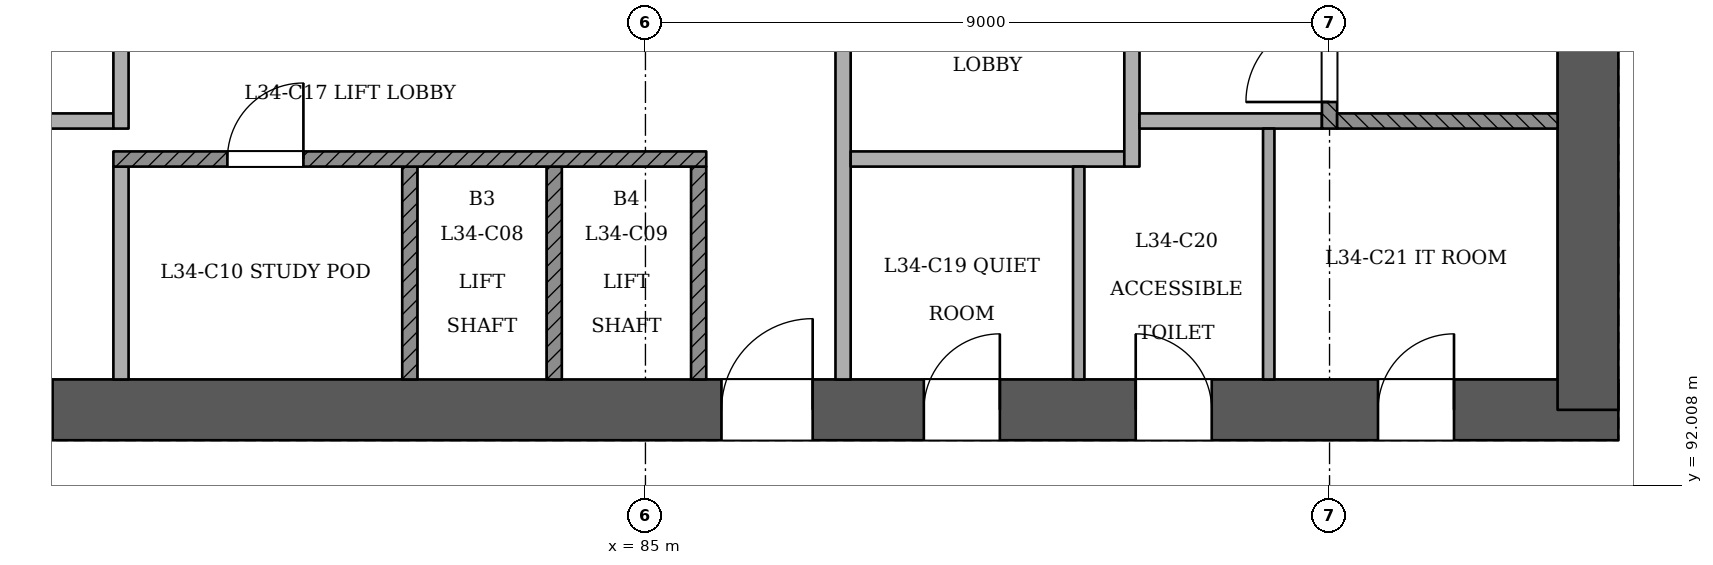
"""IFC4 building model, lengths in metres.
Left out: names, types, materials, properties, quantities, classifications, styles, units other than length and angle.
Written with IfcOpenShell. Run it as: python <this file> out.ifc"""

import sys

from ifc_helpers import new_model, si_unit, direction, frame, frame_2d, origin, place, context, subcontext, project, spatial, rectangle, extrude, element, fill, save


model = new_model("IFC4")
c1 = context("Model", 3, precision=1e-05, world=origin(), true_north=direction((0.0, 1.0)))
c2 = subcontext(c1, "Body", "Model", "MODEL_VIEW")
j1 = project(units=[si_unit("LENGTHUNIT", "METRE"), si_unit("PLANEANGLEUNIT", "RADIAN")], contexts=[c1])
p1 = place(None, origin())
s1 = spatial("IfcSite", under=j1, at=p1, CompositionType="ELEMENT")
p2 = place(p1, origin())
s2 = spatial("IfcBuilding", under=s1, at=p2, CompositionType="ELEMENT")
p3 = place(p2, frame((0.0, 0.0, 135.0)))
s3 = spatial("IfcBuildingStorey", under=s2, at=p3, CompositionType="ELEMENT", Elevation=135.0)
p4 = place(p3, frame((72.6, 93.0, 0.0), z_axis=(0.0, 0.0, 1.0), x_axis=(1.0, 0.0, 0.0)))
e1 = element("IfcWall", 1, at=p4, inside=s3, PredefinedType="SHEAR", context=c2, shape_type="SweptSolid", body=[
    extrude(rectangle(XDim=25.2, YDim=0.8, at=frame_2d((12.6, 0.0))), origin(), (0.0, 0.0, 1.0), 3.6),
])
p5 = place(p4, frame((1.2, 0.0, 0.0)))
e2 = element("IfcOpeningElement", 2, at=p5, cuts=e1, PredefinedType="OPENING", context=c2, shape_type="SweptSolid", body=[
    extrude(rectangle(XDim=1.2, YDim=2.1, at=frame_2d((0.6, 1.05))), frame((0.0, 0.411, 0.0), z_axis=(0.0, -1.0, 0.0), x_axis=(1.0, 0.0, 0.0)), (0.0, 0.0, 1.0), 0.821),
])
p6 = place(p4, frame((3.4, 0.0, 0.0)))
e3 = element("IfcOpeningElement", 3, at=p6, cuts=e1, PredefinedType="OPENING", context=c2, shape_type="SweptSolid", body=[
    extrude(rectangle(XDim=1.2, YDim=2.1, at=frame_2d((0.6, 1.05))), frame((0.0, 0.411, 0.0), z_axis=(0.0, -1.0, 0.0), x_axis=(1.0, 0.0, 0.0)), (0.0, 0.0, 1.0), 0.821),
])
p7 = place(p4, frame((13.4, 0.0, 0.0)))
e4 = element("IfcOpeningElement", 4, at=p7, cuts=e1, PredefinedType="OPENING", context=c2, shape_type="SweptSolid", body=[
    extrude(rectangle(XDim=1.2, YDim=2.1, at=frame_2d((0.6, 1.05))), frame((0.0, 0.411, 0.0), z_axis=(0.0, -1.0, 0.0), x_axis=(1.0, 0.0, 0.0)), (0.0, 0.0, 1.0), 0.821),
])
p8 = place(p4, frame((16.062, 0.0, 0.0)))
e5 = element("IfcOpeningElement", 5, at=p8, cuts=e1, PredefinedType="OPENING", context=c2, shape_type="SweptSolid", body=[
    extrude(rectangle(XDim=1.0, YDim=2.1, at=frame_2d((0.5, 1.05))), frame((0.0, 0.411, 0.0), z_axis=(0.0, -1.0, 0.0), x_axis=(1.0, 0.0, 0.0)), (0.0, 0.0, 1.0), 0.821),
])
p9 = place(p4, frame((18.85, 0.0, 0.0)))
e6 = element("IfcOpeningElement", 6, at=p9, cuts=e1, PredefinedType="OPENING", context=c2, shape_type="SweptSolid", body=[
    extrude(rectangle(XDim=1.0, YDim=2.1, at=frame_2d((0.5, 1.05))), frame((0.0, 0.411, 0.0), z_axis=(0.0, -1.0, 0.0), x_axis=(1.0, 0.0, 0.0)), (0.0, 0.0, 1.0), 0.821),
])
p10 = place(p4, frame((22.038, 0.0, 0.0)))
e7 = element("IfcOpeningElement", 7, at=p10, cuts=e1, PredefinedType="OPENING", context=c2, shape_type="SweptSolid", body=[
    extrude(rectangle(XDim=1.0, YDim=2.1, at=frame_2d((0.5, 1.05))), frame((0.0, 0.411, 0.0), z_axis=(0.0, -1.0, 0.0), x_axis=(1.0, 0.0, 0.0)), (0.0, 0.0, 1.0), 0.821),
])
p11 = place(p3, frame((97.4, 93.0, 0.0), z_axis=(0.0, 0.0, 1.0), x_axis=(0.0, 1.0, 0.0)))
e8 = element("IfcWall", 8, at=p11, inside=s3, PredefinedType="SHEAR", context=c2, shape_type="SweptSolid", body=[
    extrude(rectangle(XDim=11.2, YDim=0.8, at=frame_2d((5.6, 0.0))), origin(), (0.0, 0.0, 1.0), 3.6),
])
p12 = place(p3, frame((64.777, 98.34, 0.0), z_axis=(0.0, 0.0, 1.0), x_axis=(0.499997513821, -0.866026839176, 0.0)))
e9 = element("IfcWall", 9, at=p12, inside=s3, PredefinedType="PARTITIONING", context=c2, shape_type="SweptSolid", body=[
    extrude(rectangle(XDim=40.26, YDim=0.15, at=frame_2d((20.13, 0.0))), origin(), (0.0, 0.0, 1.0), 2.75),
])
p13 = place(p12, frame((0.2, 0.0, 0.0)))
e10 = element("IfcOpeningElement", 10, at=p13, cuts=e9, PredefinedType="OPENING", context=c2, shape_type="SweptSolid", body=[
    extrude(rectangle(XDim=1.2, YDim=2.1, at=frame_2d((0.6, 1.05))), frame((0.0, 0.085, 0.0), z_axis=(0.0, -1.0, 0.0), x_axis=(1.0, 0.0, 0.0)), (0.0, 0.0, 1.0), 0.171),
])
p14 = place(p12, frame((9.525, 0.0, 0.0)))
e11 = element("IfcOpeningElement", 11, at=p14, cuts=e9, PredefinedType="OPENING", context=c2, shape_type="SweptSolid", body=[
    extrude(rectangle(XDim=1.0, YDim=2.1, at=frame_2d((0.5, 1.05))), frame((0.0, 0.085, 0.0), z_axis=(0.0, -1.0, 0.0), x_axis=(1.0, 0.0, 0.0)), (0.0, 0.0, 1.0), 0.171),
])
p15 = place(p12, frame((11.735, 0.0, 0.0)))
e12 = element("IfcOpeningElement", 12, at=p15, cuts=e9, PredefinedType="OPENING", context=c2, shape_type="SweptSolid", body=[
    extrude(rectangle(XDim=1.0, YDim=2.1, at=frame_2d((0.5, 1.05))), frame((0.0, 0.085, 0.0), z_axis=(0.0, -1.0, 0.0), x_axis=(1.0, 0.0, 0.0)), (0.0, 0.0, 1.0), 0.171),
])
p16 = place(p12, frame((19.53, 0.0, 0.0)))
e13 = element("IfcOpeningElement", 13, at=p16, cuts=e9, PredefinedType="OPENING", context=c2, shape_type="SweptSolid", body=[
    extrude(rectangle(XDim=1.2, YDim=2.1, at=frame_2d((0.6, 1.05))), frame((0.0, 0.085, 0.0), z_axis=(0.0, -1.0, 0.0), x_axis=(1.0, 0.0, 0.0)), (0.0, 0.0, 1.0), 0.171),
])
p17 = place(p12, frame((27.41, 0.0, 0.0)))
e14 = element("IfcOpeningElement", 14, at=p17, cuts=e9, PredefinedType="OPENING", context=c2, shape_type="SweptSolid", body=[
    extrude(rectangle(XDim=1.0, YDim=2.1, at=frame_2d((0.5, 1.05))), frame((0.0, 0.085, 0.0), z_axis=(0.0, -1.0, 0.0), x_axis=(1.0, 0.0, 0.0)), (0.0, 0.0, 1.0), 0.171),
])
p18 = place(p12, frame((34.13, 0.0, 0.0)))
e15 = element("IfcOpeningElement", 15, at=p18, cuts=e9, PredefinedType="OPENING", context=c2, shape_type="SweptSolid", body=[
    extrude(rectangle(XDim=1.2, YDim=2.1, at=frame_2d((0.6, 1.05))), frame((0.0, 0.085, 0.0), z_axis=(0.0, -1.0, 0.0), x_axis=(1.0, 0.0, 0.0)), (0.0, 0.0, 1.0), 0.171),
])
p19 = place(p12, frame((38.78, 0.0, 0.0)))
e16 = element("IfcOpeningElement", 16, at=p19, cuts=e9, PredefinedType="OPENING", context=c2, shape_type="SweptSolid", body=[
    extrude(rectangle(XDim=1.0, YDim=2.1, at=frame_2d((0.5, 1.05))), frame((0.0, 0.085, 0.0), z_axis=(0.0, -1.0, 0.0), x_axis=(1.0, 0.0, 0.0)), (0.0, 0.0, 1.0), 0.171),
])
p20 = place(p3, frame((85.093, 63.473, 0.0), z_axis=(0.0, 0.0, 1.0), x_axis=(0.499997513821, 0.866026839176, 0.0)))
e17 = element("IfcWall", 17, at=p20, inside=s3, PredefinedType="PARTITIONING", context=c2, shape_type="SweptSolid", body=[
    extrude(rectangle(XDim=40.26, YDim=0.15, at=frame_2d((20.13, 0.0))), origin(), (0.0, 0.0, 1.0), 2.75),
])
p21 = place(p20, frame((0.429, 0.0, 0.0)))
e18 = element("IfcOpeningElement", 18, at=p21, cuts=e17, PredefinedType="OPENING", context=c2, shape_type="SweptSolid", body=[
    extrude(rectangle(XDim=1.2, YDim=2.1, at=frame_2d((0.6, 1.05))), frame((0.0, 0.085, 0.0), z_axis=(0.0, -1.0, 0.0), x_axis=(1.0, 0.0, 0.0)), (0.0, 0.0, 1.0), 0.171),
])
p22 = place(p20, frame((2.85, 0.0, 0.0)))
e19 = element("IfcOpeningElement", 19, at=p22, cuts=e17, PredefinedType="OPENING", context=c2, shape_type="SweptSolid", body=[
    extrude(rectangle(XDim=1.0, YDim=2.1, at=frame_2d((0.5, 1.05))), frame((0.0, 0.085, 0.0), z_axis=(0.0, -1.0, 0.0), x_axis=(1.0, 0.0, 0.0)), (0.0, 0.0, 1.0), 0.171),
])
p23 = place(p20, frame((8.28, 0.0, 0.0)))
e20 = element("IfcOpeningElement", 20, at=p23, cuts=e17, PredefinedType="OPENING", context=c2, shape_type="SweptSolid", body=[
    extrude(rectangle(XDim=1.2, YDim=2.1, at=frame_2d((0.6, 1.05))), frame((0.0, 0.085, 0.0), z_axis=(0.0, -1.0, 0.0), x_axis=(1.0, 0.0, 0.0)), (0.0, 0.0, 1.0), 0.171),
])
p24 = place(p20, frame((11.735, 0.0, 0.0)))
e21 = element("IfcOpeningElement", 21, at=p24, cuts=e17, PredefinedType="OPENING", context=c2, shape_type="SweptSolid", body=[
    extrude(rectangle(XDim=1.0, YDim=2.1, at=frame_2d((0.5, 1.05))), frame((0.0, 0.085, 0.0), z_axis=(0.0, -1.0, 0.0), x_axis=(1.0, 0.0, 0.0)), (0.0, 0.0, 1.0), 0.171),
])
p25 = place(p20, frame((18.41, 0.0, 0.0)))
e22 = element("IfcOpeningElement", 22, at=p25, cuts=e17, PredefinedType="OPENING", context=c2, shape_type="SweptSolid", body=[
    extrude(rectangle(XDim=1.0, YDim=2.1, at=frame_2d((0.5, 1.05))), frame((0.0, 0.085, 0.0), z_axis=(0.0, -1.0, 0.0), x_axis=(1.0, 0.0, 0.0)), (0.0, 0.0, 1.0), 0.171),
])
p26 = place(p20, frame((20.85, 0.0, 0.0)))
e23 = element("IfcOpeningElement", 23, at=p26, cuts=e17, PredefinedType="OPENING", context=c2, shape_type="SweptSolid", body=[
    extrude(rectangle(XDim=1.0, YDim=2.1, at=frame_2d((0.5, 1.05))), frame((0.0, 0.085, 0.0), z_axis=(0.0, -1.0, 0.0), x_axis=(1.0, 0.0, 0.0)), (0.0, 0.0, 1.0), 0.171),
])
p27 = place(p20, frame((26.38, 0.0, 0.0)))
e24 = element("IfcOpeningElement", 24, at=p27, cuts=e17, PredefinedType="OPENING", context=c2, shape_type="SweptSolid", body=[
    extrude(rectangle(XDim=1.0, YDim=2.1, at=frame_2d((0.5, 1.05))), frame((0.0, 0.085, 0.0), z_axis=(0.0, -1.0, 0.0), x_axis=(1.0, 0.0, 0.0)), (0.0, 0.0, 1.0), 0.171),
])
p28 = place(p20, frame((34.13, 0.0, 0.0)))
e25 = element("IfcOpeningElement", 25, at=p28, cuts=e17, PredefinedType="OPENING", context=c2, shape_type="SweptSolid", body=[
    extrude(rectangle(XDim=1.2, YDim=2.1, at=frame_2d((0.6, 1.05))), frame((0.0, 0.085, 0.0), z_axis=(0.0, -1.0, 0.0), x_axis=(1.0, 0.0, 0.0)), (0.0, 0.0, 1.0), 0.171),
])
p29 = place(p20, frame((38.86, 0.0, 0.0)))
e26 = element("IfcOpeningElement", 26, at=p29, cuts=e17, PredefinedType="OPENING", context=c2, shape_type="SweptSolid", body=[
    extrude(rectangle(XDim=1.2, YDim=2.1, at=frame_2d((0.6, 1.05))), frame((0.0, 0.085, 0.0), z_axis=(0.0, -1.0, 0.0), x_axis=(1.0, 0.0, 0.0)), (0.0, 0.0, 1.0), 0.171),
])
p30 = place(p3, frame((78.1, 93.4, 0.0), z_axis=(0.0, 0.0, 1.0), x_axis=(0.0, 1.0, 0.0)))
e27 = element("IfcWall", 27, at=p30, inside=s3, PredefinedType="PARTITIONING", context=c2, shape_type="SweptSolid", body=[
    extrude(rectangle(XDim=2.8, YDim=0.2, at=frame_2d((1.4, 0.0))), origin(), (0.0, 0.0, 1.0), 3.15),
])
for number, where, z_axis, x_axis in (
    (28, (81.9, 93.4, 0.0), (0.0, 0.0, 1.0), (0.0, 1.0, 0.0)),
    (29, (83.8, 93.4, 0.0), (0.0, 0.0, 1.0), (0.0, 1.0, 0.0)),
    (30, (85.7, 93.4, 0.0), (0.0, 0.0, 1.0), (0.0, 1.0, 0.0)),
):
    element("IfcWall", number, at=place(p3, frame(where, z_axis=z_axis, x_axis=x_axis)), inside=s3, PredefinedType="SOLIDWALL", context=c2, shape_type="SweptSolid", body=[
        extrude(rectangle(XDim=2.8, YDim=0.2, at=frame_2d((1.4, 0.0))), origin(), (0.0, 0.0, 1.0), 3.15),
    ])
p31 = place(p3, frame((87.6, 93.4, 0.0), z_axis=(0.0, 0.0, 1.0), x_axis=(0.0, 1.0, 0.0)))
e31 = element("IfcWall", 31, at=p31, inside=s3, PredefinedType="PARTITIONING", context=c2, shape_type="SweptSolid", body=[
    extrude(rectangle(XDim=7.0, YDim=0.2, at=frame_2d((3.5, 0.0))), origin(), (0.0, 0.0, 1.0), 3.15),
])
p32 = place(p31, frame((4.45, 0.0, 0.0)))
e32 = element("IfcOpeningElement", 32, at=p32, cuts=e31, PredefinedType="OPENING", context=c2, shape_type="SweptSolid", body=[
    extrude(rectangle(XDim=1.1, YDim=2.1, at=frame_2d((0.55, 1.05))), frame((0.0, 0.11, 0.0), z_axis=(0.0, -1.0, 0.0), x_axis=(1.0, 0.0, 0.0)), (0.0, 0.0, 1.0), 0.221),
])
p33 = place(p3, frame((90.7, 93.4, 0.0), z_axis=(0.0, 0.0, 1.0), x_axis=(0.0, 1.0, 0.0)))
e33 = element("IfcWall", 33, at=p33, inside=s3, PredefinedType="PARTITIONING", context=c2, shape_type="SweptSolid", body=[
    extrude(rectangle(XDim=2.8, YDim=0.15, at=frame_2d((1.4, 0.0))), origin(), (0.0, 0.0, 1.0), 3.15),
])
p34 = place(p3, frame((93.2, 93.4, 0.0), z_axis=(0.0, 0.0, 1.0), x_axis=(0.0, 1.0, 0.0)))
e34 = element("IfcWall", 34, at=p34, inside=s3, PredefinedType="PARTITIONING", context=c2, shape_type="SweptSolid", body=[
    extrude(rectangle(XDim=3.3, YDim=0.15, at=frame_2d((1.65, 0.0))), origin(), (0.0, 0.0, 1.0), 3.15),
])
p35 = place(p3, frame((78.0, 96.3, 0.0), z_axis=(0.0, 0.0, 1.0), x_axis=(1.0, 0.0, 0.0)))
e35 = element("IfcWall", 35, at=p35, inside=s3, PredefinedType="SOLIDWALL", context=c2, shape_type="SweptSolid", body=[
    extrude(rectangle(XDim=7.8, YDim=0.2, at=frame_2d((3.9, 0.0))), origin(), (0.0, 0.0, 1.0), 3.15),
])
p36 = place(p35, frame((1.5, 0.0, 0.0)))
e36 = element("IfcOpeningElement", 36, at=p36, cuts=e35, PredefinedType="OPENING", context=c2, shape_type="SweptSolid", body=[
    extrude(rectangle(XDim=1.0, YDim=2.1, at=frame_2d((0.5, 1.05))), frame((0.0, 0.11, 0.0), z_axis=(0.0, -1.0, 0.0), x_axis=(1.0, 0.0, 0.0)), (0.0, 0.0, 1.0), 0.221),
])
p37 = place(p3, frame((87.7, 96.3, 0.0), z_axis=(0.0, 0.0, 1.0), x_axis=(1.0, 0.0, 0.0)))
e37 = element("IfcWall", 37, at=p37, inside=s3, PredefinedType="PARTITIONING", context=c2, shape_type="SweptSolid", body=[
    extrude(rectangle(XDim=3.6, YDim=0.2, at=frame_2d((1.8, 0.0))), origin(), (0.0, 0.0, 1.0), 3.15),
])
p38 = place(p3, frame((91.4, 96.2, 0.0), z_axis=(0.0, 0.0, 1.0), x_axis=(0.0, 1.0, 0.0)))
e38 = element("IfcWall", 38, at=p38, inside=s3, PredefinedType="PARTITIONING", context=c2, shape_type="SweptSolid", body=[
    extrude(rectangle(XDim=4.2, YDim=0.2, at=frame_2d((2.1, 0.0))), origin(), (0.0, 0.0, 1.0), 3.15),
])
p39 = place(p38, frame((2.45, 0.0, 0.0)))
e39 = element("IfcOpeningElement", 39, at=p39, cuts=e38, PredefinedType="OPENING", context=c2, shape_type="SweptSolid", body=[
    extrude(rectangle(XDim=1.1, YDim=2.1, at=frame_2d((0.55, 1.05))), frame((0.0, 0.11, 0.0), z_axis=(0.0, -1.0, 0.0), x_axis=(1.0, 0.0, 0.0)), (0.0, 0.0, 1.0), 0.221),
])
p40 = place(p3, frame((76.1, 96.8, 0.0), z_axis=(0.0, 0.0, 1.0), x_axis=(1.0, 0.0, 0.0)))
e40 = element("IfcWall", 40, at=p40, inside=s3, PredefinedType="PARTITIONING", context=c2, shape_type="SweptSolid", body=[
    extrude(rectangle(XDim=1.9, YDim=0.2, at=frame_2d((0.95, 0.0))), origin(), (0.0, 0.0, 1.0), 3.15),
])
p41 = place(p3, frame((78.1, 96.7, 0.0), z_axis=(0.0, 0.0, 1.0), x_axis=(0.0, 1.0, 0.0)))
e41 = element("IfcWall", 41, at=p41, inside=s3, PredefinedType="PARTITIONING", context=c2, shape_type="SweptSolid", body=[
    extrude(rectangle(XDim=3.7, YDim=0.2, at=frame_2d((1.85, 0.0))), origin(), (0.0, 0.0, 1.0), 3.15),
])
p42 = place(p41, frame((1.95, 0.0, 0.0)))
e42 = element("IfcOpeningElement", 42, at=p42, cuts=e41, PredefinedType="OPENING", context=c2, shape_type="SweptSolid", body=[
    extrude(rectangle(XDim=1.1, YDim=2.1, at=frame_2d((0.55, 1.05))), frame((0.0, 0.11, 0.0), z_axis=(0.0, -1.0, 0.0), x_axis=(1.0, 0.0, 0.0)), (0.0, 0.0, 1.0), 0.221),
])
p43 = place(p3, frame((91.5, 96.8, 0.0), z_axis=(0.0, 0.0, 1.0), x_axis=(1.0, 0.0, 0.0)))
e43 = element("IfcWall", 43, at=p43, inside=s3, PredefinedType="PARTITIONING", context=c2, shape_type="SweptSolid", body=[
    extrude(rectangle(XDim=2.4, YDim=0.2, at=frame_2d((1.2, 0.0))), origin(), (0.0, 0.0, 1.0), 3.15),
])
p44 = place(p3, frame((94.0, 96.7, 0.0), z_axis=(0.0, 0.0, 1.0), x_axis=(0.0, 1.0, 0.0)))
e44 = element("IfcWall", 44, at=p44, inside=s3, PredefinedType="SOLIDWALL", context=c2, shape_type="SweptSolid", body=[
    extrude(rectangle(XDim=3.7, YDim=0.2, at=frame_2d((1.85, 0.0))), origin(), (0.0, 0.0, 1.0), 3.15),
])
p45 = place(p44, frame((0.35, 0.0, 0.0)))
e45 = element("IfcOpeningElement", 45, at=p45, cuts=e44, PredefinedType="OPENING", context=c2, shape_type="SweptSolid", body=[
    extrude(rectangle(XDim=1.1, YDim=2.1, at=frame_2d((0.55, 1.05))), frame((0.0, 0.11, 0.0), z_axis=(0.0, -1.0, 0.0), x_axis=(1.0, 0.0, 0.0)), (0.0, 0.0, 1.0), 0.221),
])
p46 = place(p3, frame((94.1, 96.8, 0.0), z_axis=(0.0, 0.0, 1.0), x_axis=(1.0, 0.0, 0.0)))
e46 = element("IfcWall", 46, at=p46, inside=s3, PredefinedType="SOLIDWALL", context=c2, shape_type="SweptSolid", body=[
    extrude(rectangle(XDim=2.9, YDim=0.2, at=frame_2d((1.45, 0.0))), origin(), (0.0, 0.0, 1.0), 3.15),
])
p47 = place(p45, origin())
e47 = element("IfcDoor", 47, at=p47, inside=s3, OperationType="SINGLE_SWING_LEFT", PredefinedType="NOTDEFINED", context=c2, shape_type="SweptSolid", body=[
    extrude(rectangle(XDim=1.1, YDim=2.1, at=frame_2d((0.55, 1.05))), frame((0.0, 0.025, 0.0), z_axis=(0.0, -1.0, 0.0), x_axis=(1.0, 0.0, 0.0)), (0.0, 0.0, 1.0), 0.05),
])
fill(e45, e47)
p48 = place(p6, origin())
e48 = element("IfcDoor", 48, at=p48, inside=s3, OperationType="SINGLE_SWING_LEFT", PredefinedType="NOTDEFINED", context=c2, shape_type="SweptSolid", body=[
    extrude(rectangle(XDim=1.2, YDim=2.1, at=frame_2d((0.6, 1.05))), frame((0.0, 0.025, 0.0), z_axis=(0.0, -1.0, 0.0), x_axis=(1.0, 0.0, 0.0)), (0.0, 0.0, 1.0), 0.05),
])
fill(e3, e48)
p49 = place(p7, origin())
e49 = element("IfcDoor", 49, at=p49, inside=s3, OperationType="SINGLE_SWING_RIGHT", PredefinedType="NOTDEFINED", context=c2, shape_type="SweptSolid", body=[
    extrude(rectangle(XDim=1.2, YDim=2.1, at=frame_2d((0.6, 1.05))), frame((0.0, 0.025, 0.0), z_axis=(0.0, -1.0, 0.0), x_axis=(1.0, 0.0, 0.0)), (0.0, 0.0, 1.0), 0.05),
])
fill(e4, e49)
p50 = place(p8, origin())
e50 = element("IfcDoor", 50, at=p50, inside=s3, OperationType="SINGLE_SWING_RIGHT", PredefinedType="NOTDEFINED", context=c2, shape_type="SweptSolid", body=[
    extrude(rectangle(XDim=1.0, YDim=2.1, at=frame_2d((0.5, 1.05))), frame((0.0, 0.025, 0.0), z_axis=(0.0, -1.0, 0.0), x_axis=(1.0, 0.0, 0.0)), (0.0, 0.0, 1.0), 0.05),
])
fill(e5, e50)
p51 = place(p9, origin())
e51 = element("IfcDoor", 51, at=p51, inside=s3, OperationType="SINGLE_SWING_LEFT", PredefinedType="NOTDEFINED", context=c2, shape_type="SweptSolid", body=[
    extrude(rectangle(XDim=1.0, YDim=2.1, at=frame_2d((0.5, 1.05))), frame((0.0, 0.025, 0.0), z_axis=(0.0, -1.0, 0.0), x_axis=(1.0, 0.0, 0.0)), (0.0, 0.0, 1.0), 0.05),
])
fill(e6, e51)
p52 = place(p10, origin())
e52 = element("IfcDoor", 52, at=p52, inside=s3, OperationType="SINGLE_SWING_RIGHT", PredefinedType="NOTDEFINED", context=c2, shape_type="SweptSolid", body=[
    extrude(rectangle(XDim=1.0, YDim=2.1, at=frame_2d((0.5, 1.05))), frame((0.0, 0.025, 0.0), z_axis=(0.0, -1.0, 0.0), x_axis=(1.0, 0.0, 0.0)), (0.0, 0.0, 1.0), 0.05),
])
fill(e7, e52)
p53 = place(p36, origin())
e53 = element("IfcDoor", 53, at=p53, inside=s3, OperationType="SINGLE_SWING_RIGHT", PredefinedType="NOTDEFINED", context=c2, shape_type="SweptSolid", body=[
    extrude(rectangle(XDim=1.0, YDim=2.1, at=frame_2d((0.5, 1.05))), frame((0.0, 0.025, 0.0), z_axis=(0.0, -1.0, 0.0), x_axis=(1.0, 0.0, 0.0)), (0.0, 0.0, 1.0), 0.05),
])
fill(e36, e53)
save(model, sys.argv[1])
